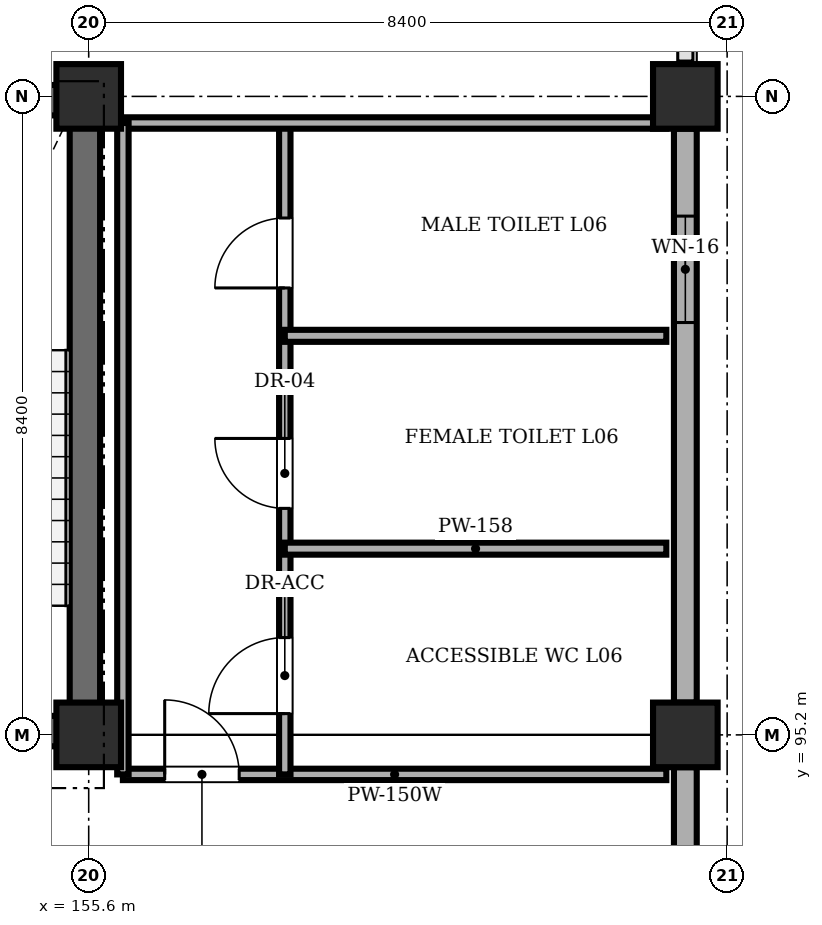
"""IFC4 building model, lengths in metres.
Left out: names, types, materials, properties, quantities, classifications, styles, units other than length and angle.
Written with IfcOpenShell. Run it as: python <this file> out.ifc"""

import sys

from ifc_helpers import new_model, si_unit, direction, frame, frame_2d, origin, origin_2d, place, context, subcontext, project, spatial, rectangle, extrude, element, fill, save


model = new_model("IFC4")
c1 = context("Model", 3, precision=1e-05, world=origin(), true_north=direction((0.0, 1.0)))
c2 = subcontext(c1, "Body", "Model", "MODEL_VIEW")
j1 = project(units=[si_unit("LENGTHUNIT", "METRE"), si_unit("PLANEANGLEUNIT", "RADIAN")], contexts=[c1])
p1 = place(None, origin())
s1 = spatial("IfcSite", under=j1, at=p1, CompositionType="ELEMENT")
p2 = place(p1, origin())
s2 = spatial("IfcBuilding", under=s1, at=p2, CompositionType="ELEMENT")
p3 = place(p2, frame((0.0, 0.0, 23.4)))
s3 = spatial("IfcBuildingStorey", under=s2, at=p3, CompositionType="ELEMENT", Elevation=23.4)
for number, where, z_axis, x_axis in (
    (1, (155.6, 95.2, 0.0), (0.0, 0.0, 1.0), (1.0, 0.0, 0.0)),
    (2, (155.6, 103.6, 0.0), (0.0, 0.0, 1.0), (1.0, 0.0, 0.0)),
    (3, (163.45, 95.2, 0.0), (0.0, 0.0, 1.0), (1.0, 0.0, 0.0)),
    (4, (163.45, 103.6, 0.0), (0.0, 0.0, 1.0), (1.0, 0.0, 0.0)),
):
    element("IfcColumn", number, at=place(p3, frame(where, z_axis=z_axis, x_axis=x_axis)), inside=s3, PredefinedType="COLUMN", context=c2, shape_type="SweptSolid", body=[
        extrude(rectangle(XDim=0.85, YDim=0.85, at=origin_2d()), origin(), (0.0, 0.0, 1.0), 4.0),
    ])
for number, where, z_axis, x_axis in (
    (5, (151.85, 95.25, 0.0), (0.0, 0.0, 1.0), (1.0, 0.0, 0.0)),
    (6, (151.85, 103.55, 0.0), (0.0, 0.0, 1.0), (1.0, 0.0, 0.0)),
):
    element("IfcWall", number, at=place(p3, frame(where, z_axis=z_axis, x_axis=x_axis)), inside=s3, PredefinedType="SHEAR", context=c2, shape_type="SweptSolid", body=[
        extrude(rectangle(XDim=3.9, YDim=0.4, at=frame_2d((1.95, 0.0))), origin(), (0.0, 0.0, 1.0), 4.0),
    ])
p4 = place(p3, frame((155.55, 95.45, 0.0), z_axis=(0.0, 0.0, 1.0), x_axis=(0.0, 1.0, 0.0)))
e7 = element("IfcWall", 7, at=p4, inside=s3, PredefinedType="SHEAR", context=c2, shape_type="SweptSolid", body=[
    extrude(rectangle(XDim=7.9, YDim=0.4, at=frame_2d((3.95, 0.0))), origin(), (0.0, 0.0, 1.0), 4.0),
])
p5 = place(p3, frame((163.45, 94.775, 0.0), z_axis=(0.0, 0.0, 1.0), x_axis=(0.0, -1.0, 0.0)))
e8 = element("IfcWall", 8, at=p5, inside=s3, PredefinedType="STANDARD", context=c2, shape_type="SweptSolid", body=[
    extrude(rectangle(XDim=7.55, YDim=0.3, at=frame_2d((3.775, 0.0))), origin(), (0.0, 0.0, 1.0), 3.3),
])
p6 = place(p5, frame((4.2, 0.0, 1.1)))
e9 = element("IfcOpeningElement", 9, at=p6, cuts=e8, PredefinedType="OPENING", context=c2, shape_type="SweptSolid", body=[
    extrude(rectangle(XDim=1.55, YDim=1.75, at=frame_2d((0.775, 0.875))), frame((0.0, 0.16, 0.0), z_axis=(0.0, -1.0, 0.0), x_axis=(1.0, 0.0, 0.0)), (0.0, 0.0, 1.0), 0.32),
])
p7 = place(p3, frame((163.45, 103.175, 0.0), z_axis=(0.0, 0.0, 1.0), x_axis=(0.0, -1.0, 0.0)))
e10 = element("IfcWall", 10, at=p7, inside=s3, PredefinedType="STANDARD", context=c2, shape_type="SweptSolid", body=[
    extrude(rectangle(XDim=7.55, YDim=0.3, at=frame_2d((3.775, 0.0))), origin(), (0.0, 0.0, 1.0), 3.3),
])
p8 = place(p7, frame((1.15, 0.0, 1.1)))
e11 = element("IfcOpeningElement", 11, at=p8, cuts=e10, PredefinedType="OPENING", context=c2, shape_type="SweptSolid", body=[
    extrude(rectangle(XDim=1.4, YDim=1.4, at=frame_2d((0.7, 0.7))), frame((0.0, 0.16, 0.0), z_axis=(0.0, -1.0, 0.0), x_axis=(1.0, 0.0, 0.0)), (0.0, 0.0, 1.0), 0.32),
])
p9 = place(p3, frame((156.05, 94.68, 0.0), z_axis=(0.0, 0.0, 1.0), x_axis=(1.0, 0.0, 0.0)))
e12 = element("IfcWall", 12, at=p9, inside=s3, PredefinedType="PARTITIONING", context=c2, shape_type="SweptSolid", body=[
    extrude(rectangle(XDim=7.15, YDim=0.15, at=frame_2d((3.575, 0.0))), origin(), (0.0, 0.0, 1.0), 4.0),
])
p10 = place(p9, frame((0.55, 0.0, 0.0)))
e13 = element("IfcOpeningElement", 13, at=p10, cuts=e12, PredefinedType="OPENING", context=c2, shape_type="SweptSolid", body=[
    extrude(rectangle(XDim=0.98, YDim=2.12, at=frame_2d((0.49, 1.06))), frame((0.0, 0.085, 0.0), z_axis=(0.0, -1.0, 0.0), x_axis=(1.0, 0.0, 0.0)), (0.0, 0.0, 1.0), 0.17),
])
p11 = place(p3, frame((158.18, 94.68, 0.0), z_axis=(0.0, 0.0, 1.0), x_axis=(0.0, 1.0, 0.0)))
e14 = element("IfcWall", 14, at=p11, inside=s3, PredefinedType="PARTITIONING", context=c2, shape_type="SweptSolid", body=[
    extrude(rectangle(XDim=8.57, YDim=0.15, at=frame_2d((4.285, 0.0))), origin(), (0.0, 0.0, 1.0), 4.0),
])
p12 = place(p11, frame((0.8, 0.0, 0.0)))
e15 = element("IfcOpeningElement", 15, at=p12, cuts=e14, PredefinedType="OPENING", context=c2, shape_type="SweptSolid", body=[
    extrude(rectangle(XDim=1.0, YDim=2.12, at=frame_2d((0.5, 1.06))), frame((0.0, 0.085, 0.0), z_axis=(0.0, -1.0, 0.0), x_axis=(1.0, 0.0, 0.0)), (0.0, 0.0, 1.0), 0.17),
])
p13 = place(p11, frame((3.5, 0.0, 0.0)))
e16 = element("IfcOpeningElement", 16, at=p13, cuts=e14, PredefinedType="OPENING", context=c2, shape_type="SweptSolid", body=[
    extrude(rectangle(XDim=0.92, YDim=2.1, at=frame_2d((0.46, 1.05))), frame((0.0, 0.085, 0.0), z_axis=(0.0, -1.0, 0.0), x_axis=(1.0, 0.0, 0.0)), (0.0, 0.0, 1.0), 0.17),
])
p14 = place(p11, frame((6.4, 0.0, 0.0)))
e17 = element("IfcOpeningElement", 17, at=p14, cuts=e14, PredefinedType="OPENING", context=c2, shape_type="SweptSolid", body=[
    extrude(rectangle(XDim=0.92, YDim=2.1, at=frame_2d((0.46, 1.05))), frame((0.0, 0.085, 0.0), z_axis=(0.0, -1.0, 0.0), x_axis=(1.0, 0.0, 0.0)), (0.0, 0.0, 1.0), 0.17),
])
for number, where, z_axis, x_axis in (
    (18, (158.18, 97.65, 0.0), (0.0, 0.0, 1.0), (1.0, 0.0, 0.0)),
    (19, (158.18, 100.45, 0.0), (0.0, 0.0, 1.0), (1.0, 0.0, 0.0)),
):
    element("IfcWall", number, at=place(p3, frame(where, z_axis=z_axis, x_axis=x_axis)), inside=s3, PredefinedType="PARTITIONING", context=c2, shape_type="SweptSolid", body=[
        extrude(rectangle(XDim=5.02, YDim=0.158, at=frame_2d((2.51, 0.0))), origin(), (0.0, 0.0, 1.0), 4.0),
    ])
p15 = place(p3, frame((156.05, 103.25, 0.0), z_axis=(0.0, 0.0, 1.0), x_axis=(1.0, 0.0, 0.0)))
e20 = element("IfcWall", 20, at=p15, inside=s3, PredefinedType="PARTITIONING", context=c2, shape_type="SweptSolid", body=[
    extrude(rectangle(XDim=7.15, YDim=0.15, at=frame_2d((3.575, 0.0))), origin(), (0.0, 0.0, 1.0), 4.0),
])
p16 = place(p3, frame((156.05, 94.68, 0.0), z_axis=(0.0, 0.0, 1.0), x_axis=(0.0, 1.0, 0.0)))
e21 = element("IfcWall", 21, at=p16, inside=s3, PredefinedType="PARTITIONING", context=c2, shape_type="SweptSolid", body=[
    extrude(rectangle(XDim=8.57, YDim=0.15, at=frame_2d((4.285, 0.0))), origin(), (0.0, 0.0, 1.0), 4.0),
])
p17 = place(p8, origin())
e22 = element("IfcWindow", 22, at=p17, inside=s3, PartitioningType="SINGLE_PANEL", PredefinedType="WINDOW", context=c2, shape_type="SweptSolid", body=[
    extrude(rectangle(XDim=1.4, YDim=1.4, at=frame_2d((0.7, 0.7))), frame((0.0, 0.03, 0.0), z_axis=(0.0, -1.0, 0.0), x_axis=(1.0, 0.0, 0.0)), (0.0, 0.0, 1.0), 0.06),
])
fill(e11, e22)
p18 = place(p10, origin())
e23 = element("IfcDoor", 23, at=p18, inside=s3, OperationType="SINGLE_SWING_LEFT", PredefinedType="DOOR", context=c2, shape_type="SweptSolid", body=[
    extrude(rectangle(XDim=0.98, YDim=2.12, at=frame_2d((0.49, 1.06))), frame((0.0, 0.025, 0.0), z_axis=(0.0, -1.0, 0.0), x_axis=(1.0, 0.0, 0.0)), (0.0, 0.0, 1.0), 0.05),
])
fill(e13, e23)
p19 = place(p12, origin())
e24 = element("IfcDoor", 24, at=p19, inside=s3, OperationType="SINGLE_SWING_LEFT", PredefinedType="DOOR", context=c2, shape_type="SweptSolid", body=[
    extrude(rectangle(XDim=1.0, YDim=2.12, at=frame_2d((0.5, 1.06))), frame((0.0, 0.025, 0.0), z_axis=(0.0, -1.0, 0.0), x_axis=(1.0, 0.0, 0.0)), (0.0, 0.0, 1.0), 0.05),
])
fill(e15, e24)
p20 = place(p13, origin())
e25 = element("IfcDoor", 25, at=p20, inside=s3, OperationType="SINGLE_SWING_RIGHT", PredefinedType="DOOR", context=c2, shape_type="SweptSolid", body=[
    extrude(rectangle(XDim=0.92, YDim=2.1, at=frame_2d((0.46, 1.05))), frame((0.0, 0.025, 0.0), z_axis=(0.0, -1.0, 0.0), x_axis=(1.0, 0.0, 0.0)), (0.0, 0.0, 1.0), 0.05),
])
fill(e16, e25)
p21 = place(p14, origin())
e26 = element("IfcDoor", 26, at=p21, inside=s3, OperationType="SINGLE_SWING_LEFT", PredefinedType="DOOR", context=c2, shape_type="SweptSolid", body=[
    extrude(rectangle(XDim=0.92, YDim=2.1, at=frame_2d((0.46, 1.05))), frame((0.0, 0.025, 0.0), z_axis=(0.0, -1.0, 0.0), x_axis=(1.0, 0.0, 0.0)), (0.0, 0.0, 1.0), 0.05),
])
fill(e17, e26)
save(model, sys.argv[1])
